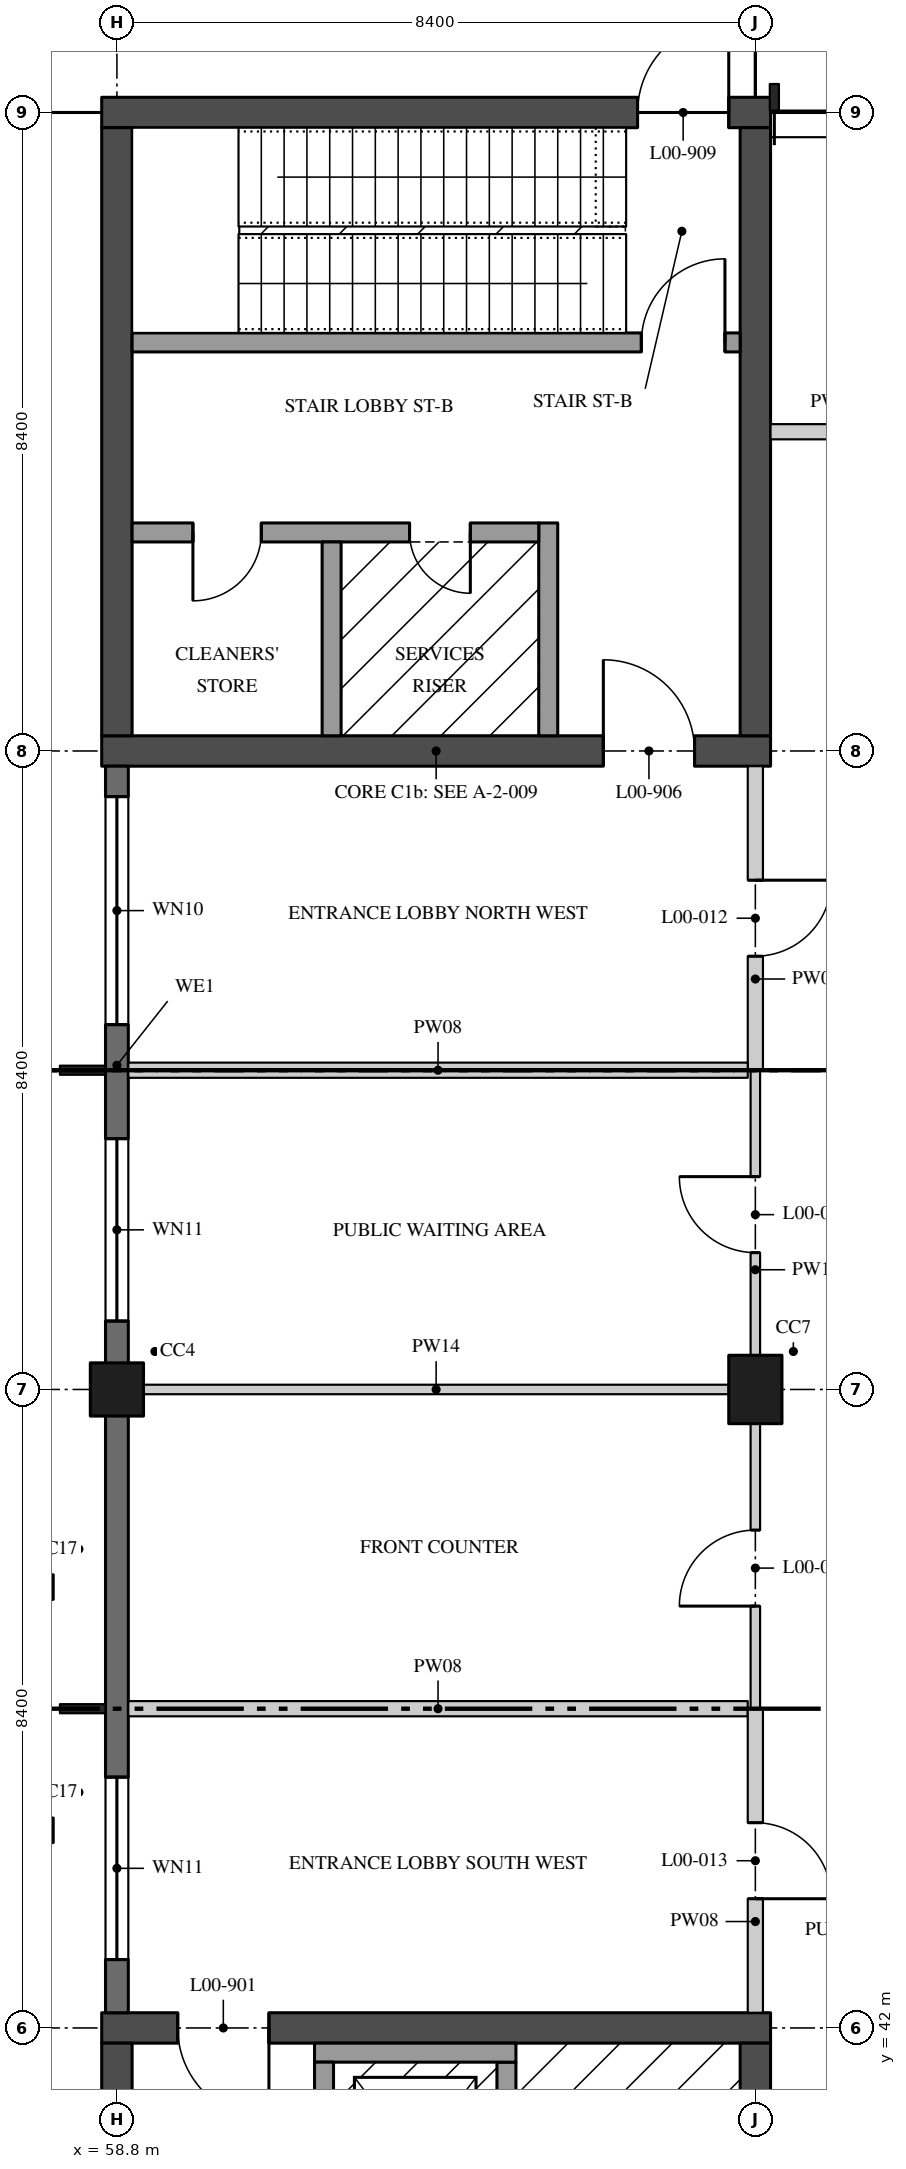
"""IFC4 building model, lengths in metres.
Left out: names, types, materials, properties, quantities, classifications, styles, units other than length and angle.
Written with IfcOpenShell. Run it as: python <this file> out.ifc"""

import sys

from ifc_helpers import new_model, si_unit, direction, frame, frame_2d, origin, origin_2d, place, context, subcontext, project, spatial, rectangle, hollow_circle, extrude, element, fill, save


model = new_model("IFC4")
c1 = context("Model", 3, precision=1e-05, world=origin(), true_north=direction((0.0, 1.0)))
c2 = subcontext(c1, "Body", "Model", "MODEL_VIEW")
j1 = project(units=[si_unit("LENGTHUNIT", "METRE"), si_unit("PLANEANGLEUNIT", "RADIAN")], contexts=[c1])
p1 = place(None, origin())
s1 = spatial("IfcSite", under=j1, at=p1, CompositionType="ELEMENT")
p2 = place(p1, origin())
s2 = spatial("IfcBuilding", under=s1, at=p2, CompositionType="ELEMENT")
p3 = place(p2, origin())
s3 = spatial("IfcBuildingStorey", under=s2, at=p3, CompositionType="ELEMENT", Elevation=0.0)
p4 = place(p3, frame((58.8, 50.4, 0.0), z_axis=(0.0, 0.0, 1.0), x_axis=(1.0, 0.0, 0.0)))
e1 = element("IfcColumn", 1, at=p4, inside=s3, PredefinedType="COLUMN", context=c2, shape_type="SweptSolid", body=[
    extrude(rectangle(XDim=0.7, YDim=0.7, at=origin_2d()), origin(), (0.0, 0.0, 1.0), 5.05),
])
p5 = place(p3, frame((67.2, 50.4, 0.0), z_axis=(0.0, 0.0, 1.0), x_axis=(1.0, 0.0, 0.0)))
e2 = element("IfcColumn", 2, at=p5, inside=s3, PredefinedType="COLUMN", context=c2, shape_type="SweptSolid", body=[
    extrude(rectangle(XDim=0.7, YDim=0.9, at=origin_2d()), origin(), (0.0, 0.0, 1.0), 5.05),
])
for number, where, z_axis, x_axis in (
    (3, (57.8, 44.6, 0.0), (0.0, 0.0, 1.0), (1.0, 0.0, 0.0)),
    (4, (57.8, 47.8, 0.0), (0.0, 0.0, 1.0), (1.0, 0.0, 0.0)),
):
    element("IfcColumn", number, at=place(p3, frame(where, z_axis=z_axis, x_axis=x_axis)), inside=s3, PredefinedType="COLUMN", context=c2, shape_type="SweptSolid", body=[
        extrude(hollow_circle(Radius=0.162, WallThickness=0.013, at=origin_2d()), origin(), (0.0, 0.0, 1.0), 4.162),
    ])
p6 = place(p3, frame((58.6, 42.0, 0.0), z_axis=(0.0, 0.0, 1.0), x_axis=(1.0, 0.0, 0.0)))
e5 = element("IfcWall", 5, at=p6, inside=s3, PredefinedType="SHEAR", context=c2, shape_type="SweptSolid", body=[
    extrude(rectangle(XDim=8.8, YDim=0.4, at=frame_2d((4.4, 0.0))), origin(), (0.0, 0.0, 1.0), 5.05),
])
p7 = place(p6, frame((1.0, 0.0, 0.0)))
e6 = element("IfcOpeningElement", 6, at=p7, cuts=e5, PredefinedType="OPENING", context=c2, shape_type="SweptSolid", body=[
    extrude(rectangle(XDim=1.2, YDim=2.1, at=frame_2d((0.6, 1.05))), frame((0.0, 0.21, 0.0), z_axis=(0.0, -1.0, 0.0), x_axis=(1.0, 0.0, 0.0)), (0.0, 0.0, 1.0), 0.42),
])
for number, where, z_axis, x_axis in (
    (7, (58.8, 33.8, 0.0), (0.0, 0.0, 1.0), (0.0, 1.0, 0.0)),
    (8, (67.2, 33.8, 0.0), (0.0, 0.0, 1.0), (0.0, 1.0, 0.0)),
):
    element("IfcWall", number, at=place(p3, frame(where, z_axis=z_axis, x_axis=x_axis)), inside=s3, PredefinedType="SHEAR", context=c2, shape_type="SweptSolid", body=[
        extrude(rectangle(XDim=8.0, YDim=0.4, at=frame_2d((4.0, 0.0))), origin(), (0.0, 0.0, 1.0), 5.05),
    ])
p8 = place(p3, frame((58.6, 58.8, 0.0), z_axis=(0.0, 0.0, 1.0), x_axis=(1.0, 0.0, 0.0)))
e9 = element("IfcWall", 9, at=p8, inside=s3, PredefinedType="SHEAR", context=c2, shape_type="SweptSolid", body=[
    extrude(rectangle(XDim=8.8, YDim=0.4, at=frame_2d((4.4, 0.0))), origin(), (0.0, 0.0, 1.0), 5.05),
])
p9 = place(p8, frame((6.6, 0.0, 0.0)))
e10 = element("IfcOpeningElement", 10, at=p9, cuts=e9, PredefinedType="OPENING", context=c2, shape_type="SweptSolid", body=[
    extrude(rectangle(XDim=1.2, YDim=2.1, at=frame_2d((0.6, 1.05))), frame((0.0, 0.21, 0.0), z_axis=(0.0, -1.0, 0.0), x_axis=(1.0, 0.0, 0.0)), (0.0, 0.0, 1.0), 0.42),
])
p10 = place(p3, frame((58.6, 67.2, 0.0), z_axis=(0.0, 0.0, 1.0), x_axis=(1.0, 0.0, 0.0)))
e11 = element("IfcWall", 11, at=p10, inside=s3, PredefinedType="SHEAR", context=c2, shape_type="SweptSolid", body=[
    extrude(rectangle(XDim=8.8, YDim=0.4, at=frame_2d((4.4, 0.0))), origin(), (0.0, 0.0, 1.0), 5.05),
])
p11 = place(p10, frame((7.05, 0.0, 0.0)))
e12 = element("IfcOpeningElement", 12, at=p11, cuts=e11, PredefinedType="OPENING", context=c2, shape_type="SweptSolid", body=[
    extrude(rectangle(XDim=1.2, YDim=2.1, at=frame_2d((0.6, 1.05))), frame((0.0, 0.21, 0.0), z_axis=(0.0, -1.0, 0.0), x_axis=(1.0, 0.0, 0.0)), (0.0, 0.0, 1.0), 0.42),
])
for number, where, z_axis, x_axis in (
    (13, (58.8, 59.0, 0.0), (0.0, 0.0, 1.0), (0.0, 1.0, 0.0)),
    (14, (67.2, 59.0, 0.0), (0.0, 0.0, 1.0), (0.0, 1.0, 0.0)),
):
    element("IfcWall", number, at=place(p3, frame(where, z_axis=z_axis, x_axis=x_axis)), inside=s3, PredefinedType="SHEAR", context=c2, shape_type="SweptSolid", body=[
        extrude(rectangle(XDim=8.0, YDim=0.4, at=frame_2d((4.0, 0.0))), origin(), (0.0, 0.0, 1.0), 5.05),
    ])
p12 = place(p3, frame((67.0, 64.175, 0.0), z_axis=(0.0, 0.0, 1.0), x_axis=(-1.0, 0.0, 0.0)))
e15 = element("IfcWall", 15, at=p12, inside=s3, PredefinedType="SOLIDWALL", context=c2, shape_type="SweptSolid", body=[
    extrude(rectangle(XDim=8.0, YDim=0.25, at=frame_2d((4.0, 0.0))), origin(), (0.0, 0.0, 1.0), 5.05),
])
p13 = place(p12, frame((0.2, 0.0, 0.0)))
e16 = element("IfcOpeningElement", 16, at=p13, cuts=e15, PredefinedType="OPENING", context=c2, shape_type="SweptSolid", body=[
    extrude(rectangle(XDim=1.1, YDim=2.1, at=frame_2d((0.55, 1.05))), frame((0.0, 0.135, 0.0), z_axis=(0.0, -1.0, 0.0), x_axis=(1.0, 0.0, 0.0)), (0.0, 0.0, 1.0), 0.27),
])
p14 = place(p3, frame((64.475, 61.8, 0.0), z_axis=(0.0, 0.0, 1.0), x_axis=(0.0, -1.0, 0.0)))
e17 = element("IfcWall", 17, at=p14, inside=s3, PredefinedType="SOLIDWALL", context=c2, shape_type="SweptSolid", body=[
    extrude(rectangle(XDim=2.8, YDim=0.25, at=frame_2d((1.4, 0.0))), origin(), (0.0, 0.0, 1.0), 5.05),
])
p15 = place(p3, frame((64.35, 61.675, 0.0), z_axis=(0.0, 0.0, 1.0), x_axis=(-1.0, 0.0, 0.0)))
e18 = element("IfcWall", 18, at=p15, inside=s3, PredefinedType="SOLIDWALL", context=c2, shape_type="SweptSolid", body=[
    extrude(rectangle(XDim=5.35, YDim=0.25, at=frame_2d((2.675, 0.0))), origin(), (0.0, 0.0, 1.0), 5.05),
])
p16 = place(p15, frame((3.65, 0.0, 0.0)))
e19 = element("IfcOpeningElement", 19, at=p16, cuts=e18, PredefinedType="OPENING", context=c2, shape_type="SweptSolid", body=[
    extrude(rectangle(XDim=0.9, YDim=2.1, at=frame_2d((0.45, 1.05))), frame((0.0, 0.135, 0.0), z_axis=(0.0, -1.0, 0.0), x_axis=(1.0, 0.0, 0.0)), (0.0, 0.0, 1.0), 0.27),
])
p17 = place(p15, frame((0.9, 0.0, 0.0)))
e20 = element("IfcOpeningElement", 20, at=p17, cuts=e18, PredefinedType="OPENING", context=c2, shape_type="SweptSolid", body=[
    extrude(rectangle(XDim=0.8, YDim=2.1, at=frame_2d((0.4, 1.05))), frame((0.0, 0.135, 0.0), z_axis=(0.0, -1.0, 0.0), x_axis=(1.0, 0.0, 0.0)), (0.0, 0.0, 1.0), 0.27),
])
p18 = place(p3, frame((61.625, 61.55, 0.0), z_axis=(0.0, 0.0, 1.0), x_axis=(0.0, -1.0, 0.0)))
e21 = element("IfcWall", 21, at=p18, inside=s3, PredefinedType="SOLIDWALL", context=c2, shape_type="SweptSolid", body=[
    extrude(rectangle(XDim=2.55, YDim=0.25, at=frame_2d((1.275, 0.0))), origin(), (0.0, 0.0, 1.0), 5.05),
])
p19 = place(p3, frame((63.925, 39.25, 0.0), z_axis=(0.0, 0.0, 1.0), x_axis=(0.0, 1.0, 0.0)))
e22 = element("IfcWall", 22, at=p19, inside=s3, PredefinedType="SOLIDWALL", context=c2, shape_type="SweptSolid", body=[
    extrude(rectangle(XDim=2.3, YDim=0.25, at=frame_2d((1.15, 0.0))), origin(), (0.0, 0.0, 1.0), 5.05),
])
p20 = place(p3, frame((61.4, 41.675, 0.0), z_axis=(0.0, 0.0, 1.0), x_axis=(1.0, 0.0, 0.0)))
e23 = element("IfcWall", 23, at=p20, inside=s3, PredefinedType="SOLIDWALL", context=c2, shape_type="SweptSolid", body=[
    extrude(rectangle(XDim=2.65, YDim=0.25, at=frame_2d((1.325, 0.0))), origin(), (0.0, 0.0, 1.0), 5.05),
])
p21 = place(p3, frame((61.525, 39.25, 0.0), z_axis=(0.0, 0.0, 1.0), x_axis=(0.0, 1.0, 0.0)))
e24 = element("IfcWall", 24, at=p21, inside=s3, PredefinedType="SOLIDWALL", context=c2, shape_type="SweptSolid", body=[
    extrude(rectangle(XDim=2.3, YDim=0.25, at=frame_2d((1.15, 0.0))), origin(), (0.0, 0.0, 1.0), 5.05),
])
p22 = place(p3, frame((67.2, 46.2, 0.0), z_axis=(0.0, 0.0, 1.0), x_axis=(0.0, 1.0, 0.0)))
e25 = element("IfcWall", 25, at=p22, inside=s3, PredefinedType="PARTITIONING", context=c2, shape_type="SweptSolid", body=[
    extrude(rectangle(XDim=3.75, YDim=0.125, at=frame_2d((1.875, 0.0))), origin(), (0.0, 0.0, 1.0), 18.77),
])
p23 = place(p22, frame((1.35, 0.0, 0.0)))
e26 = element("IfcOpeningElement", 26, at=p23, cuts=e25, PredefinedType="OPENING", context=c2, shape_type="SweptSolid", body=[
    extrude(rectangle(XDim=1.0, YDim=2.4, at=frame_2d((0.5, 1.2))), frame((0.0, 0.073, 0.0), z_axis=(0.0, -1.0, 0.0), x_axis=(1.0, 0.0, 0.0)), (0.0, 0.0, 1.0), 0.145),
])
p24 = place(p3, frame((59.15, 50.4, 0.0), z_axis=(0.0, 0.0, 1.0), x_axis=(1.0, 0.0, 0.0)))
e27 = element("IfcWall", 27, at=p24, inside=s3, PredefinedType="PARTITIONING", context=c2, shape_type="SweptSolid", body=[
    extrude(rectangle(XDim=7.7, YDim=0.125, at=frame_2d((3.85, 0.0))), origin(), (0.0, 0.0, 1.0), 5.05),
])
p25 = place(p3, frame((58.95, 46.2, 0.0), z_axis=(0.0, 0.0, 1.0), x_axis=(1.0, 0.0, 0.0)))
e28 = element("IfcWall", 28, at=p25, inside=s3, PredefinedType="PARTITIONING", context=c2, shape_type="SweptSolid", body=[
    extrude(rectangle(XDim=8.15, YDim=0.2, at=frame_2d((4.075, 0.0))), origin(), (0.0, 0.0, 1.0), 5.05),
])
p26 = place(p3, frame((67.2, 50.85, 0.0), z_axis=(0.0, 0.0, 1.0), x_axis=(0.0, 1.0, 0.0)))
e29 = element("IfcWall", 29, at=p26, inside=s3, PredefinedType="PARTITIONING", context=c2, shape_type="SweptSolid", body=[
    extrude(rectangle(XDim=3.75, YDim=0.125, at=frame_2d((1.875, 0.0))), origin(), (0.0, 0.0, 1.0), 18.77),
])
p27 = place(p26, frame((1.35, 0.0, 0.0)))
e30 = element("IfcOpeningElement", 30, at=p27, cuts=e29, PredefinedType="OPENING", context=c2, shape_type="SweptSolid", body=[
    extrude(rectangle(XDim=1.0, YDim=2.4, at=frame_2d((0.5, 1.2))), frame((0.0, 0.073, 0.0), z_axis=(0.0, -1.0, 0.0), x_axis=(1.0, 0.0, 0.0)), (0.0, 0.0, 1.0), 0.145),
])
p28 = place(p3, frame((67.4, 63.0, 0.0), z_axis=(0.0, 0.0, 1.0), x_axis=(1.0, 0.0, 0.0)))
e31 = element("IfcWall", 31, at=p28, inside=s3, PredefinedType="PARTITIONING", context=c2, shape_type="SweptSolid", body=[
    extrude(rectangle(XDim=4.1, YDim=0.2, at=frame_2d((2.05, 0.0))), origin(), (0.0, 0.0, 1.0), 18.77),
])
p29 = place(p28, frame((1.55, 0.0, 0.0)))
e32 = element("IfcOpeningElement", 32, at=p29, cuts=e31, PredefinedType="OPENING", context=c2, shape_type="SweptSolid", body=[
    extrude(rectangle(XDim=1.0, YDim=2.1, at=frame_2d((0.5, 1.05))), frame((0.0, 0.11, 0.0), z_axis=(0.0, -1.0, 0.0), x_axis=(1.0, 0.0, 0.0)), (0.0, 0.0, 1.0), 0.22),
])
p30 = place(p3, frame((67.2, 54.6, 0.0), z_axis=(0.0, 0.0, 1.0), x_axis=(0.0, 1.0, 0.0)))
e33 = element("IfcWall", 33, at=p30, inside=s3, PredefinedType="PARTITIONING", context=c2, shape_type="SweptSolid", body=[
    extrude(rectangle(XDim=4.0, YDim=0.2, at=frame_2d((2.0, 0.0))), origin(), (0.0, 0.0, 1.0), 18.77),
])
p31 = place(p30, frame((1.5, 0.0, 0.0)))
e34 = element("IfcOpeningElement", 34, at=p31, cuts=e33, PredefinedType="OPENING", context=c2, shape_type="SweptSolid", body=[
    extrude(rectangle(XDim=1.0, YDim=2.4, at=frame_2d((0.5, 1.2))), frame((0.0, 0.11, 0.0), z_axis=(0.0, -1.0, 0.0), x_axis=(1.0, 0.0, 0.0)), (0.0, 0.0, 1.0), 0.22),
])
p32 = place(p3, frame((67.2, 42.2, 0.0), z_axis=(0.0, 0.0, 1.0), x_axis=(0.0, 1.0, 0.0)))
e35 = element("IfcWall", 35, at=p32, inside=s3, PredefinedType="PARTITIONING", context=c2, shape_type="SweptSolid", body=[
    extrude(rectangle(XDim=4.0, YDim=0.2, at=frame_2d((2.0, 0.0))), origin(), (0.0, 0.0, 1.0), 18.77),
])
p33 = place(p32, frame((1.5, 0.0, 0.0)))
e36 = element("IfcOpeningElement", 36, at=p33, cuts=e35, PredefinedType="OPENING", context=c2, shape_type="SweptSolid", body=[
    extrude(rectangle(XDim=1.0, YDim=2.4, at=frame_2d((0.5, 1.2))), frame((0.0, 0.11, 0.0), z_axis=(0.0, -1.0, 0.0), x_axis=(1.0, 0.0, 0.0)), (0.0, 0.0, 1.0), 0.22),
])
p34 = place(p3, frame((58.95, 54.6, 0.0), z_axis=(0.0, 0.0, 1.0), x_axis=(1.0, 0.0, 0.0)))
e37 = element("IfcWall", 37, at=p34, inside=s3, PredefinedType="PARTITIONING", context=c2, shape_type="SweptSolid", body=[
    extrude(rectangle(XDim=8.15, YDim=0.2, at=frame_2d((4.075, 0.0))), origin(), (0.0, 0.0, 1.0), 5.05),
])
p35 = place(p3, frame((58.8, 58.6, 0.0), z_axis=(0.0, 0.0, 1.0), x_axis=(0.0, -1.0, 0.0)))
e38 = element("IfcWall", 38, at=p35, inside=s3, PredefinedType="SOLIDWALL", context=c2, shape_type="SweptSolid", body=[
    extrude(rectangle(XDim=7.87, YDim=0.3, at=frame_2d((3.935, 0.0))), origin(), (0.0, 0.0, 1.0), 5.05),
])
p36 = place(p35, frame((0.4, 0.0, 2.85)))
e39 = element("IfcOpeningElement", 39, at=p36, cuts=e38, PredefinedType="OPENING", context=c2, shape_type="SweptSolid", body=[
    extrude(rectangle(XDim=3.0, YDim=1.2, at=frame_2d((1.5, 0.6))), frame((0.0, 0.16, 0.0), z_axis=(0.0, -1.0, 0.0), x_axis=(1.0, 0.0, 0.0)), (0.0, 0.0, 1.0), 0.32),
])
p37 = place(p35, frame((4.9, 0.0, 2.25)))
e40 = element("IfcOpeningElement", 40, at=p37, cuts=e38, PredefinedType="OPENING", context=c2, shape_type="SweptSolid", body=[
    extrude(rectangle(XDim=2.4, YDim=1.8, at=frame_2d((1.2, 0.9))), frame((0.0, 0.16, 0.0), z_axis=(0.0, -1.0, 0.0), x_axis=(1.0, 0.0, 0.0)), (0.0, 0.0, 1.0), 0.32),
])
p38 = place(p3, frame((58.8, 50.07, 0.0), z_axis=(0.0, 0.0, 1.0), x_axis=(0.0, -1.0, 0.0)))
e41 = element("IfcWall", 41, at=p38, inside=s3, PredefinedType="SOLIDWALL", context=c2, shape_type="SweptSolid", body=[
    extrude(rectangle(XDim=7.87, YDim=0.3, at=frame_2d((3.935, 0.0))), origin(), (0.0, 0.0, 1.0), 5.05),
])
p39 = place(p38, frame((4.77, 0.0, 2.25)))
e42 = element("IfcOpeningElement", 42, at=p39, cuts=e41, PredefinedType="OPENING", context=c2, shape_type="SweptSolid", body=[
    extrude(rectangle(XDim=2.4, YDim=1.8, at=frame_2d((1.2, 0.9))), frame((0.0, 0.16, 0.0), z_axis=(0.0, -1.0, 0.0), x_axis=(1.0, 0.0, 0.0)), (0.0, 0.0, 1.0), 0.32),
])
p40 = place(p7, frame((1.2, 0.0, 0.0), z_axis=(0.0, 0.0, 1.0), x_axis=(-1.0, 0.0, 0.0)))
e43 = element("IfcDoor", 43, at=p40, inside=s3, OperationType="SINGLE_SWING_RIGHT", PredefinedType="DOOR", context=c2, shape_type="SweptSolid", body=[
    extrude(rectangle(XDim=1.2, YDim=2.1, at=frame_2d((0.6, 1.05))), frame((0.0, 0.035, 0.0), z_axis=(0.0, -1.0, 0.0), x_axis=(1.0, 0.0, 0.0)), (0.0, 0.0, 1.0), 0.07),
])
fill(e6, e43)
p41 = place(p16, origin())
e44 = element("IfcDoor", 44, at=p41, inside=s3, OperationType="SINGLE_SWING_LEFT", PredefinedType="DOOR", context=c2, shape_type="SweptSolid", body=[
    extrude(rectangle(XDim=0.9, YDim=2.1, at=frame_2d((0.45, 1.05))), frame((0.0, 0.035, 0.0), z_axis=(0.0, -1.0, 0.0), x_axis=(1.0, 0.0, 0.0)), (0.0, 0.0, 1.0), 0.07),
])
fill(e19, e44)
p42 = place(p9, origin())
e45 = element("IfcDoor", 45, at=p42, inside=s3, OperationType="SINGLE_SWING_RIGHT", PredefinedType="DOOR", context=c2, shape_type="SweptSolid", body=[
    extrude(rectangle(XDim=1.2, YDim=2.1, at=frame_2d((0.6, 1.05))), frame((0.0, 0.035, 0.0), z_axis=(0.0, -1.0, 0.0), x_axis=(1.0, 0.0, 0.0)), (0.0, 0.0, 1.0), 0.07),
])
fill(e10, e45)
p43 = place(p17, origin())
e46 = element("IfcDoor", 46, at=p43, inside=s3, OperationType="SINGLE_SWING_RIGHT", PredefinedType="DOOR", context=c2, shape_type="SweptSolid", body=[
    extrude(rectangle(XDim=0.8, YDim=2.1, at=frame_2d((0.4, 1.05))), frame((0.0, 0.035, 0.0), z_axis=(0.0, -1.0, 0.0), x_axis=(1.0, 0.0, 0.0)), (0.0, 0.0, 1.0), 0.07),
])
fill(e20, e46)
p44 = place(p13, frame((1.1, 0.0, 0.0), z_axis=(0.0, 0.0, 1.0), x_axis=(-1.0, 0.0, 0.0)))
e47 = element("IfcDoor", 47, at=p44, inside=s3, OperationType="SINGLE_SWING_LEFT", PredefinedType="DOOR", context=c2, shape_type="SweptSolid", body=[
    extrude(rectangle(XDim=1.1, YDim=2.1, at=frame_2d((0.55, 1.05))), frame((0.0, 0.035, 0.0), z_axis=(0.0, -1.0, 0.0), x_axis=(1.0, 0.0, 0.0)), (0.0, 0.0, 1.0), 0.07),
])
fill(e16, e47)
p45 = place(p11, origin())
e48 = element("IfcDoor", 48, at=p45, inside=s3, OperationType="SINGLE_SWING_LEFT", PredefinedType="DOOR", context=c2, shape_type="SweptSolid", body=[
    extrude(rectangle(XDim=1.2, YDim=2.1, at=frame_2d((0.6, 1.05))), frame((0.0, 0.035, 0.0), z_axis=(0.0, -1.0, 0.0), x_axis=(1.0, 0.0, 0.0)), (0.0, 0.0, 1.0), 0.07),
])
fill(e12, e48)
p46 = place(p23, origin())
e49 = element("IfcDoor", 49, at=p46, inside=s3, OperationType="SINGLE_SWING_RIGHT", PredefinedType="DOOR", context=c2, shape_type="SweptSolid", body=[
    extrude(rectangle(XDim=1.0, YDim=2.4, at=frame_2d((0.5, 1.2))), frame((0.0, 0.02, 0.0), z_axis=(0.0, -1.0, 0.0), x_axis=(1.0, 0.0, 0.0)), (0.0, 0.0, 1.0), 0.04),
])
fill(e26, e49)
p47 = place(p27, origin())
e50 = element("IfcDoor", 50, at=p47, inside=s3, OperationType="SINGLE_SWING_LEFT", PredefinedType="DOOR", context=c2, shape_type="SweptSolid", body=[
    extrude(rectangle(XDim=1.0, YDim=2.4, at=frame_2d((0.5, 1.2))), frame((0.0, 0.02, 0.0), z_axis=(0.0, -1.0, 0.0), x_axis=(1.0, 0.0, 0.0)), (0.0, 0.0, 1.0), 0.04),
])
fill(e30, e50)
p48 = place(p31, frame((1.0, 0.0, 0.0), z_axis=(0.0, 0.0, 1.0), x_axis=(-1.0, 0.0, 0.0)))
e51 = element("IfcDoor", 51, at=p48, inside=s3, OperationType="SINGLE_SWING_RIGHT", PredefinedType="DOOR", context=c2, shape_type="SweptSolid", body=[
    extrude(rectangle(XDim=1.0, YDim=2.4, at=frame_2d((0.5, 1.2))), frame((0.0, 0.03, 0.0), z_axis=(0.0, -1.0, 0.0), x_axis=(1.0, 0.0, 0.0)), (0.0, 0.0, 1.0), 0.06),
])
fill(e34, e51)
p49 = place(p33, frame((1.0, 0.0, 0.0), z_axis=(0.0, 0.0, 1.0), x_axis=(-1.0, 0.0, 0.0)))
e52 = element("IfcDoor", 52, at=p49, inside=s3, OperationType="SINGLE_SWING_LEFT", PredefinedType="DOOR", context=c2, shape_type="SweptSolid", body=[
    extrude(rectangle(XDim=1.0, YDim=2.4, at=frame_2d((0.5, 1.2))), frame((0.0, 0.03, 0.0), z_axis=(0.0, -1.0, 0.0), x_axis=(1.0, 0.0, 0.0)), (0.0, 0.0, 1.0), 0.06),
])
fill(e36, e52)
p50 = place(p36, origin())
e53 = element("IfcWindow", 53, at=p50, inside=s3, PartitioningType="SINGLE_PANEL", PredefinedType="WINDOW", context=c2, shape_type="SweptSolid", body=[
    extrude(rectangle(XDim=3.0, YDim=1.2, at=frame_2d((1.5, 0.6))), frame((0.0, 0.05, 0.0), z_axis=(0.0, -1.0, 0.0), x_axis=(1.0, 0.0, 0.0)), (0.0, 0.0, 1.0), 0.1),
])
fill(e39, e53)
p51 = place(p37, origin())
e54 = element("IfcWindow", 54, at=p51, inside=s3, PartitioningType="SINGLE_PANEL", PredefinedType="WINDOW", context=c2, shape_type="SweptSolid", body=[
    extrude(rectangle(XDim=2.4, YDim=1.8, at=frame_2d((1.2, 0.9))), frame((0.0, 0.05, 0.0), z_axis=(0.0, -1.0, 0.0), x_axis=(1.0, 0.0, 0.0)), (0.0, 0.0, 1.0), 0.1),
])
fill(e40, e54)
p52 = place(p39, origin())
e55 = element("IfcWindow", 55, at=p52, inside=s3, PartitioningType="SINGLE_PANEL", PredefinedType="WINDOW", context=c2, shape_type="SweptSolid", body=[
    extrude(rectangle(XDim=2.4, YDim=1.8, at=frame_2d((1.2, 0.9))), frame((0.0, 0.05, 0.0), z_axis=(0.0, -1.0, 0.0), x_axis=(1.0, 0.0, 0.0)), (0.0, 0.0, 1.0), 0.1),
])
fill(e42, e55)
save(model, sys.argv[1])
